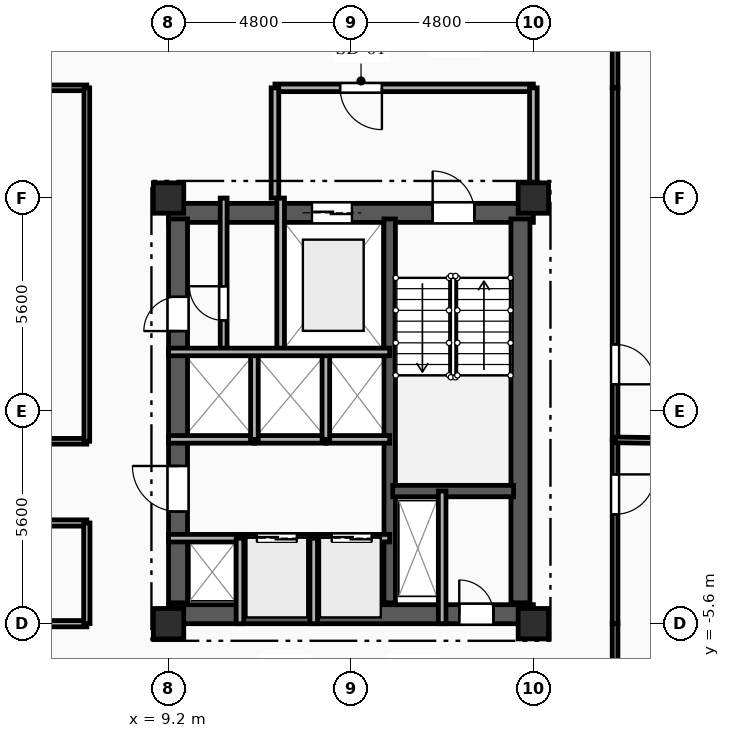
"""IFC4 building model, lengths in metres.
Left out: names, types, materials, properties, quantities, classifications, styles, units other than length and angle.
Written with IfcOpenShell. Run it as: python <this file> out.ifc"""

import sys

from ifc_helpers import new_model, si_unit, direction, frame, frame_2d, origin, origin_2d, place, context, subcontext, project, spatial, rectangle, extrude, element, fill, save


model = new_model("IFC4")
c1 = context("Model", 3, precision=1e-05, world=origin(), true_north=direction((0.0, 1.0)))
c2 = subcontext(c1, "Body", "Model", "MODEL_VIEW")
j1 = project(units=[si_unit("LENGTHUNIT", "METRE"), si_unit("PLANEANGLEUNIT", "RADIAN")], contexts=[c1])
p1 = place(None, origin())
s1 = spatial("IfcSite", under=j1, at=p1, CompositionType="ELEMENT")
p2 = place(p1, origin())
s2 = spatial("IfcBuilding", under=s1, at=p2, CompositionType="ELEMENT")
p3 = place(p2, frame((0.0, 0.0, 199.75)))
s3 = spatial("IfcBuildingStorey", under=s2, at=p3, CompositionType="ELEMENT", Elevation=199.75)
for number, where, z_axis, x_axis in (
    (1, (9.2, -5.6, 0.0), (0.0, 0.0, 1.0), (1.0, 0.0, 0.0)),
    (2, (9.2, 5.6, 0.0), (0.0, 0.0, 1.0), (1.0, 0.0, 0.0)),
    (3, (18.8, -5.6, 0.0), (0.0, 0.0, 1.0), (1.0, 0.0, 0.0)),
    (4, (18.8, 5.6, 0.0), (0.0, 0.0, 1.0), (1.0, 0.0, 0.0)),
):
    element("IfcColumn", number, at=place(p3, frame(where, z_axis=z_axis, x_axis=x_axis)), inside=s3, PredefinedType="COLUMN", context=c2, shape_type="SweptSolid", body=[
        extrude(rectangle(XDim=0.8, YDim=0.8, at=origin_2d()), origin(), (0.0, 0.0, 1.0), 3.35),
    ])
p4 = place(p3, frame((9.2, 5.21, 0.0), z_axis=(0.0, 0.0, 1.0), x_axis=(1.0, 0.0, 0.0)))
e5 = element("IfcWall", 5, at=p4, inside=s3, PredefinedType="SHEAR", context=c2, shape_type="SweptSolid", body=[
    extrude(rectangle(XDim=9.6, YDim=0.5, at=frame_2d((4.8, 0.0))), origin(), (0.0, 0.0, 1.0), 3.04),
])
p5 = place(p4, frame((6.95, 0.0, 0.0)))
e6 = element("IfcOpeningElement", 6, at=p5, cuts=e5, PredefinedType="OPENING", context=c2, shape_type="SweptSolid", body=[
    extrude(rectangle(XDim=1.1, YDim=2.15, at=frame_2d((0.55, 1.075))), frame((0.0, 0.26, 0.0), z_axis=(0.0, -1.0, 0.0), x_axis=(1.0, 0.0, 0.0)), (0.0, 0.0, 1.0), 0.52),
])
p6 = place(p4, frame((3.775, 0.0, 0.0)))
e7 = element("IfcOpeningElement", 7, at=p6, cuts=e5, PredefinedType="OPENING", context=c2, shape_type="SweptSolid", body=[
    extrude(rectangle(XDim=1.05, YDim=2.1, at=frame_2d((0.525, 1.05))), frame((0.0, 0.26, 0.0), z_axis=(0.0, -1.0, 0.0), x_axis=(1.0, 0.0, 0.0)), (0.0, 0.0, 1.0), 0.52),
])
p7 = place(p3, frame((9.2, -5.35, 0.0), z_axis=(0.0, 0.0, 1.0), x_axis=(1.0, 0.0, 0.0)))
e8 = element("IfcWall", 8, at=p7, inside=s3, PredefinedType="SHEAR", context=c2, shape_type="SweptSolid", body=[
    extrude(rectangle(XDim=9.6, YDim=0.5, at=frame_2d((4.8, 0.0))), origin(), (0.0, 0.0, 1.0), 3.04),
])
p8 = place(p7, frame((7.65, 0.0, 0.0)))
e9 = element("IfcOpeningElement", 9, at=p8, cuts=e8, PredefinedType="OPENING", context=c2, shape_type="SweptSolid", body=[
    extrude(rectangle(XDim=0.9, YDim=2.1, at=frame_2d((0.45, 1.05))), frame((0.0, 0.26, 0.0), z_axis=(0.0, -1.0, 0.0), x_axis=(1.0, 0.0, 0.0)), (0.0, 0.0, 1.0), 0.52),
])
p9 = place(p3, frame((9.45, -5.05, 0.0), z_axis=(0.0, 0.0, 1.0), x_axis=(0.0, 1.0, 0.0)))
e10 = element("IfcWall", 10, at=p9, inside=s3, PredefinedType="SHEAR", context=c2, shape_type="SweptSolid", body=[
    extrude(rectangle(XDim=10.1, YDim=0.5, at=frame_2d((5.05, 0.0))), origin(), (0.0, 0.0, 1.0), 3.04),
])
p10 = place(p9, frame((7.15, 0.0, 0.0)))
e11 = element("IfcOpeningElement", 11, at=p10, cuts=e10, PredefinedType="OPENING", context=c2, shape_type="SweptSolid", body=[
    extrude(rectangle(XDim=0.9, YDim=2.1, at=frame_2d((0.45, 1.05))), frame((0.0, 0.26, 0.0), z_axis=(0.0, -1.0, 0.0), x_axis=(1.0, 0.0, 0.0)), (0.0, 0.0, 1.0), 0.52),
])
p11 = place(p9, frame((2.4, 0.0, 0.0)))
e12 = element("IfcOpeningElement", 12, at=p11, cuts=e10, PredefinedType="OPENING", context=c2, shape_type="SweptSolid", body=[
    extrude(rectangle(XDim=1.2, YDim=2.15, at=frame_2d((0.6, 1.075))), frame((0.0, 0.26, 0.0), z_axis=(0.0, -1.0, 0.0), x_axis=(1.0, 0.0, 0.0)), (0.0, 0.0, 1.0), 0.52),
])
p12 = place(p3, frame((18.46, -5.05, 0.0), z_axis=(0.0, 0.0, 1.0), x_axis=(0.0, 1.0, 0.0)))
e13 = element("IfcWall", 13, at=p12, inside=s3, PredefinedType="SHEAR", context=c2, shape_type="SweptSolid", body=[
    extrude(rectangle(XDim=10.1, YDim=0.5, at=frame_2d((5.05, 0.0))), origin(), (0.0, 0.0, 1.0), 3.04),
])
p13 = place(p3, frame((15.02, -5.05, 0.0), z_axis=(0.0, 0.0, 1.0), x_axis=(0.0, 1.0, 0.0)))
e14 = element("IfcWall", 14, at=p13, inside=s3, PredefinedType="SHEAR", context=c2, shape_type="SweptSolid", body=[
    extrude(rectangle(XDim=10.1, YDim=0.3, at=frame_2d((5.05, 0.0))), origin(), (0.0, 0.0, 1.0), 3.04),
])
p14 = place(p3, frame((15.1, -2.11, 0.0), z_axis=(0.0, 0.0, 1.0), x_axis=(1.0, 0.0, 0.0)))
e15 = element("IfcWall", 15, at=p14, inside=s3, PredefinedType="SHEAR", context=c2, shape_type="SweptSolid", body=[
    extrude(rectangle(XDim=3.18, YDim=0.3, at=frame_2d((1.59, 0.0))), origin(), (0.0, 0.0, 1.0), 3.04),
])
p15 = place(p3, frame((16.4, -2.11, 0.0), z_axis=(0.0, 0.0, 1.0), x_axis=(0.0, -1.0, 0.0)))
e16 = element("IfcWall", 16, at=p15, inside=s3, PredefinedType="PARTITIONING", context=c2, shape_type="SweptSolid", body=[
    extrude(rectangle(XDim=3.49, YDim=0.2, at=frame_2d((1.745, 0.0))), origin(), (0.0, 0.0, 1.0), 3.04),
])
p16 = place(p3, frame((12.15, 5.6, 0.0), z_axis=(0.0, 0.0, 1.0), x_axis=(0.0, -1.0, 0.0)))
e17 = element("IfcWall", 17, at=p16, inside=s3, PredefinedType="PARTITIONING", context=c2, shape_type="SweptSolid", body=[
    extrude(rectangle(XDim=4.05, YDim=0.2, at=frame_2d((2.025, 0.0))), origin(), (0.0, 0.0, 1.0), 3.04),
])
p17 = place(p3, frame((18.8, 8.5, 0.0), z_axis=(0.0, 0.0, 1.0), x_axis=(-1.0, 0.0, 0.0)))
e18 = element("IfcWall", 18, at=p17, inside=s3, PredefinedType="PARTITIONING", context=c2, shape_type="SweptSolid", body=[
    extrude(rectangle(XDim=6.8, YDim=0.2, at=frame_2d((3.4, 0.0))), origin(), (0.0, 0.0, 1.0), 3.04),
])
p18 = place(p17, frame((3.985, 0.0, 0.0)))
e19 = element("IfcOpeningElement", 19, at=p18, cuts=e18, PredefinedType="OPENING", context=c2, shape_type="SweptSolid", body=[
    extrude(rectangle(XDim=1.1, YDim=2.15, at=frame_2d((0.55, 1.075))), frame((0.0, 0.11, 0.0), z_axis=(0.0, -1.0, 0.0), x_axis=(1.0, 0.0, 0.0)), (0.0, 0.0, 1.0), 0.22),
])
p19 = place(p3, frame((18.8, 5.6, 0.0), z_axis=(0.0, 0.0, 1.0), x_axis=(0.0, 1.0, 0.0)))
e20 = element("IfcWall", 20, at=p19, inside=s3, PredefinedType="PARTITIONING", context=c2, shape_type="SweptSolid", body=[
    extrude(rectangle(XDim=2.9, YDim=0.2, at=frame_2d((1.45, 0.0))), origin(), (0.0, 0.0, 1.0), 2.665),
])
p20 = place(p3, frame((12.0, 8.5, 0.0), z_axis=(0.0, 0.0, 1.0), x_axis=(0.0, -1.0, 0.0)))
e21 = element("IfcWall", 21, at=p20, inside=s3, PredefinedType="PARTITIONING", context=c2, shape_type="SweptSolid", body=[
    extrude(rectangle(XDim=2.9, YDim=0.2, at=frame_2d((1.45, 0.0))), origin(), (0.0, 0.0, 1.0), 3.04),
])
p21 = place(p3, frame((10.65, 1.55, 0.0), z_axis=(0.0, 0.0, 1.0), x_axis=(0.0, 1.0, 0.0)))
e22 = element("IfcWall", 22, at=p21, inside=s3, PredefinedType="PARTITIONING", context=c2, shape_type="SweptSolid", body=[
    extrude(rectangle(XDim=4.05, YDim=0.18, at=frame_2d((2.025, 0.0))), origin(), (0.0, 0.0, 1.0), 3.04),
])
p22 = place(p21, frame((0.829, 0.0, 0.0)))
e23 = element("IfcOpeningElement", 23, at=p22, cuts=e22, PredefinedType="OPENING", context=c2, shape_type="SweptSolid", body=[
    extrude(rectangle(XDim=0.9, YDim=2.1, at=frame_2d((0.45, 1.05))), frame((0.0, 0.1, 0.0), z_axis=(0.0, -1.0, 0.0), x_axis=(1.0, 0.0, 0.0)), (0.0, 0.0, 1.0), 0.2),
])
p23 = place(p3, frame((9.2, -3.35, 0.0), z_axis=(0.0, 0.0, 1.0), x_axis=(1.0, 0.0, 0.0)))
e24 = element("IfcWall", 24, at=p23, inside=s3, PredefinedType="PARTITIONING", context=c2, shape_type="SweptSolid", body=[
    extrude(rectangle(XDim=1.88, YDim=0.2, at=frame_2d((0.94, 0.0))), origin(), (0.0, 0.0, 1.0), 2.755),
])
p24 = place(p3, frame((11.08, -3.35, 0.0), z_axis=(0.0, 0.0, 1.0), x_axis=(1.0, 0.0, 0.0)))
e25 = element("IfcWall", 25, at=p24, inside=s3, PredefinedType="PARTITIONING", context=c2, shape_type="SweptSolid", body=[
    extrude(rectangle(XDim=1.94, YDim=0.2, at=frame_2d((0.97, 0.0))), origin(), (0.0, 0.0, 1.0), 3.04),
])
p25 = place(p24, frame((0.445, 0.0, 0.0)))
e26 = element("IfcOpeningElement", 26, at=p25, cuts=e25, PredefinedType="OPENING", context=c2, shape_type="SweptSolid", body=[
    extrude(rectangle(XDim=1.05, YDim=2.1, at=frame_2d((0.525, 1.05))), frame((0.0, 0.11, 0.0), z_axis=(0.0, -1.0, 0.0), x_axis=(1.0, 0.0, 0.0)), (0.0, 0.0, 1.0), 0.22),
])
p26 = place(p3, frame((13.02, -3.35, 0.0), z_axis=(0.0, 0.0, 1.0), x_axis=(1.0, 0.0, 0.0)))
e27 = element("IfcWall", 27, at=p26, inside=s3, PredefinedType="PARTITIONING", context=c2, shape_type="SweptSolid", body=[
    extrude(rectangle(XDim=2.0, YDim=0.2, at=frame_2d((1.0, 0.0))), origin(), (0.0, 0.0, 1.0), 3.04),
])
p27 = place(p26, frame((0.475, 0.0, 0.0)))
e28 = element("IfcOpeningElement", 28, at=p27, cuts=e27, PredefinedType="OPENING", context=c2, shape_type="SweptSolid", body=[
    extrude(rectangle(XDim=1.05, YDim=2.1, at=frame_2d((0.525, 1.05))), frame((0.0, 0.11, 0.0), z_axis=(0.0, -1.0, 0.0), x_axis=(1.0, 0.0, 0.0)), (0.0, 0.0, 1.0), 0.22),
])
p28 = place(p3, frame((11.46, -0.75, 0.0), z_axis=(0.0, 0.0, 1.0), x_axis=(-1.0, 0.0, 0.0)))
e29 = element("IfcWall", 29, at=p28, inside=s3, PredefinedType="PARTITIONING", context=c2, shape_type="SweptSolid", body=[
    extrude(rectangle(XDim=2.26, YDim=0.2, at=frame_2d((1.13, 0.0))), origin(), (0.0, 0.0, 1.0), 3.04),
])
p29 = place(p3, frame((13.34, -0.75, 0.0), z_axis=(0.0, 0.0, 1.0), x_axis=(-1.0, 0.0, 0.0)))
e30 = element("IfcWall", 30, at=p29, inside=s3, PredefinedType="PARTITIONING", context=c2, shape_type="SweptSolid", body=[
    extrude(rectangle(XDim=1.88, YDim=0.2, at=frame_2d((0.94, 0.0))), origin(), (0.0, 0.0, 1.0), 3.04),
])
p30 = place(p3, frame((15.02, -0.75, 0.0), z_axis=(0.0, 0.0, 1.0), x_axis=(-1.0, 0.0, 0.0)))
e31 = element("IfcWall", 31, at=p30, inside=s3, PredefinedType="PARTITIONING", context=c2, shape_type="SweptSolid", body=[
    extrude(rectangle(XDim=1.68, YDim=0.2, at=frame_2d((0.84, 0.0))), origin(), (0.0, 0.0, 1.0), 3.04),
])
for number, where, z_axis, x_axis in (
    (32, (11.08, -5.6, 0.0), (0.0, 0.0, 1.0), (0.0, 1.0, 0.0)),
    (33, (13.02, -5.6, 0.0), (0.0, 0.0, 1.0), (0.0, 1.0, 0.0)),
):
    element("IfcWall", number, at=place(p3, frame(where, z_axis=z_axis, x_axis=x_axis)), inside=s3, PredefinedType="PARTITIONING", context=c2, shape_type="SweptSolid", body=[
        extrude(rectangle(XDim=2.25, YDim=0.2, at=frame_2d((1.125, 0.0))), origin(), (0.0, 0.0, 1.0), 3.04),
    ])
for number, where, z_axis, x_axis in (
    (34, (11.46, -0.75, 0.0), (0.0, 0.0, 1.0), (0.0, 1.0, 0.0)),
    (35, (13.34, -0.75, 0.0), (0.0, 0.0, 1.0), (0.0, 1.0, 0.0)),
):
    element("IfcWall", number, at=place(p3, frame(where, z_axis=z_axis, x_axis=x_axis)), inside=s3, PredefinedType="PARTITIONING", context=c2, shape_type="SweptSolid", body=[
        extrude(rectangle(XDim=2.3, YDim=0.2, at=frame_2d((1.15, 0.0))), origin(), (0.0, 0.0, 1.0), 3.04),
    ])
p31 = place(p3, frame((20.95, 10.65, 0.0), z_axis=(0.0, 0.0, 1.0), x_axis=(0.0, -1.0, 0.0)))
e36 = element("IfcWall", 36, at=p31, inside=s3, PredefinedType="PARTITIONING", context=c2, shape_type="SweptSolid", body=[
    extrude(rectangle(XDim=2.15, YDim=0.15, at=frame_2d((1.075, 0.0))), origin(), (0.0, 0.0, 1.0), 3.04),
])
p32 = place(p3, frame((7.05, 8.5, 0.0), z_axis=(0.0, 0.0, 1.0), x_axis=(-1.0, 0.0, 0.0)))
e37 = element("IfcWall", 37, at=p32, inside=s3, PredefinedType="PARTITIONING", context=c2, shape_type="SweptSolid", body=[
    extrude(rectangle(XDim=7.05, YDim=0.15, at=frame_2d((3.525, 0.0))), origin(), (0.0, 0.0, 1.0), 3.04),
])
p33 = place(p3, frame((20.95, -5.6, 0.0), z_axis=(0.0, 0.0, 1.0), x_axis=(0.0, -1.0, 0.0)))
e38 = element("IfcWall", 38, at=p33, inside=s3, PredefinedType="PARTITIONING", context=c2, shape_type="SweptSolid", body=[
    extrude(rectangle(XDim=2.15, YDim=0.15, at=frame_2d((1.075, 0.0))), origin(), (0.0, 0.0, 1.0), 3.04),
])
p34 = place(p3, frame((0.0, -5.6, 0.0), z_axis=(0.0, 0.0, 1.0), x_axis=(1.0, 0.0, 0.0)))
e39 = element("IfcWall", 39, at=p34, inside=s3, PredefinedType="PARTITIONING", context=c2, shape_type="SweptSolid", body=[
    extrude(rectangle(XDim=7.05, YDim=0.165, at=frame_2d((3.525, 0.0))), origin(), (0.0, 0.0, 1.0), 2.525),
])
p35 = place(p3, frame((20.95, -0.763, 0.0), z_axis=(0.0, 0.0, 1.0), x_axis=(0.0, -1.0, 0.0)))
e40 = element("IfcWall", 40, at=p35, inside=s3, PredefinedType="PARTITIONING", context=c2, shape_type="SweptSolid", body=[
    extrude(rectangle(XDim=4.837, YDim=0.15, at=frame_2d((2.418, 0.0))), origin(), (0.0, 0.0, 1.0), 2.695),
])
p36 = place(p35, frame((0.908, 0.0, 0.0)))
e41 = element("IfcOpeningElement", 41, at=p36, cuts=e40, PredefinedType="OPENING", context=c2, shape_type="SweptSolid", body=[
    extrude(rectangle(XDim=1.05, YDim=2.15, at=frame_2d((0.525, 1.075))), frame((0.0, 0.085, 0.0), z_axis=(0.0, -1.0, 0.0), x_axis=(1.0, 0.0, 0.0)), (0.0, 0.0, 1.0), 0.17),
])
p37 = place(p3, frame((20.95, 8.5, 0.0), z_axis=(0.0, 0.0, 1.0), x_axis=(0.0, -1.0, 0.0)))
e42 = element("IfcWall", 42, at=p37, inside=s3, PredefinedType="PARTITIONING", context=c2, shape_type="SweptSolid", body=[
    extrude(rectangle(XDim=9.263, YDim=0.15, at=frame_2d((4.632, 0.0))), origin(), (0.0, 0.0, 1.0), 2.695),
])
p38 = place(p37, frame((6.751, 0.0, 0.0)))
e43 = element("IfcOpeningElement", 43, at=p38, cuts=e42, PredefinedType="OPENING", context=c2, shape_type="SweptSolid", body=[
    extrude(rectangle(XDim=1.05, YDim=2.15, at=frame_2d((0.525, 1.075))), frame((0.0, 0.085, 0.0), z_axis=(0.0, -1.0, 0.0), x_axis=(1.0, 0.0, 0.0)), (0.0, 0.0, 1.0), 0.17),
])
p39 = place(p3, frame((-7.05, -0.8, 0.0), z_axis=(0.0, 0.0, 1.0), x_axis=(1.0, 0.0, 0.0)))
e44 = element("IfcWall", 44, at=p39, inside=s3, PredefinedType="PARTITIONING", context=c2, shape_type="SweptSolid", body=[
    extrude(rectangle(XDim=14.1, YDim=0.15, at=frame_2d((7.05, 0.0))), origin(), (0.0, 0.0, 1.0), 3.04),
])
p40 = place(p39, frame((6.525, 0.0, 0.0)))
e45 = element("IfcOpeningElement", 45, at=p40, cuts=e44, PredefinedType="OPENING", context=c2, shape_type="SweptSolid", body=[
    extrude(rectangle(XDim=1.05, YDim=2.15, at=frame_2d((0.525, 1.075))), frame((0.0, 0.085, 0.0), z_axis=(0.0, -1.0, 0.0), x_axis=(1.0, 0.0, 0.0)), (0.0, 0.0, 1.0), 0.17),
])
p41 = place(p3, frame((7.05, -2.95, 0.0), z_axis=(0.0, 0.0, 1.0), x_axis=(-1.0, 0.0, 0.0)))
e46 = element("IfcWall", 46, at=p41, inside=s3, PredefinedType="PARTITIONING", context=c2, shape_type="SweptSolid", body=[
    extrude(rectangle(XDim=14.1, YDim=0.165, at=frame_2d((7.05, 0.0))), origin(), (0.0, 0.0, 1.0), 3.04),
])
p42 = place(p41, frame((6.475, 0.0, 0.0)))
e47 = element("IfcOpeningElement", 47, at=p42, cuts=e46, PredefinedType="OPENING", context=c2, shape_type="SweptSolid", body=[
    extrude(rectangle(XDim=1.15, YDim=2.15, at=frame_2d((0.575, 1.075))), frame((0.0, 0.093, 0.0), z_axis=(0.0, -1.0, 0.0), x_axis=(1.0, 0.0, 0.0)), (0.0, 0.0, 1.0), 0.185),
])
p43 = place(p3, frame((7.05, -0.8, 0.0), z_axis=(0.0, 0.0, 1.0), x_axis=(0.0, 1.0, 0.0)))
e48 = element("IfcWall", 48, at=p43, inside=s3, PredefinedType="PARTITIONING", context=c2, shape_type="SweptSolid", body=[
    extrude(rectangle(XDim=9.3, YDim=0.15, at=frame_2d((4.65, 0.0))), origin(), (0.0, 0.0, 1.0), 3.04),
])
p44 = place(p3, frame((7.05, -5.6, 0.0), z_axis=(0.0, 0.0, 1.0), x_axis=(0.0, 1.0, 0.0)))
e49 = element("IfcWall", 49, at=p44, inside=s3, PredefinedType="PARTITIONING", context=c2, shape_type="SweptSolid", body=[
    extrude(rectangle(XDim=2.65, YDim=0.165, at=frame_2d((1.325, 0.0))), origin(), (0.0, 0.0, 1.0), 3.04),
])
p45 = place(p3, frame((20.95, -0.763, 0.0), z_axis=(0.0, 0.0, 1.0), x_axis=(0.999875696831, -0.015766765259, 0.0)))
e50 = element("IfcWall", 50, at=p45, inside=s3, PredefinedType="PARTITIONING", context=c2, shape_type="SweptSolid", body=[
    extrude(rectangle(XDim=2.787, YDim=0.15, at=frame_2d((1.394, 0.0))), origin(), (0.0, 0.0, 1.0), 3.04),
])
p46 = place(p3, frame((9.2, 1.55, 0.0), z_axis=(0.0, 0.0, 1.0), x_axis=(1.0, 0.0, 0.0)))
e51 = element("IfcWall", 51, at=p46, inside=s3, PredefinedType="PARTITIONING", context=c2, shape_type="SweptSolid", body=[
    extrude(rectangle(XDim=5.82, YDim=0.2, at=frame_2d((2.91, 0.0))), origin(), (0.0, 0.0, 1.0), 3.04),
])
p47 = place(p5, origin())
e52 = element("IfcDoor", 52, at=p47, inside=s3, OperationType="SINGLE_SWING_LEFT", PredefinedType="DOOR", context=c2, shape_type="SweptSolid", body=[
    extrude(rectangle(XDim=1.1, YDim=2.15, at=frame_2d((0.55, 1.075))), frame((0.0, 0.025, 0.0), z_axis=(0.0, -1.0, 0.0), x_axis=(1.0, 0.0, 0.0)), (0.0, 0.0, 1.0), 0.05),
])
fill(e6, e52)
p48 = place(p6, origin())
e53 = element("IfcDoor", 53, at=p48, inside=s3, OperationType="DOUBLE_DOOR_SLIDING", PredefinedType="DOOR", context=c2, shape_type="SweptSolid", body=[
    extrude(rectangle(XDim=1.05, YDim=2.1, at=frame_2d((0.525, 1.05))), frame((0.0, 0.025, 0.0), z_axis=(0.0, -1.0, 0.0), x_axis=(1.0, 0.0, 0.0)), (0.0, 0.0, 1.0), 0.05),
])
fill(e7, e53)
p49 = place(p8, origin())
e54 = element("IfcDoor", 54, at=p49, inside=s3, OperationType="SINGLE_SWING_LEFT", PredefinedType="DOOR", context=c2, shape_type="SweptSolid", body=[
    extrude(rectangle(XDim=0.9, YDim=2.1, at=frame_2d((0.45, 1.05))), frame((0.0, 0.025, 0.0), z_axis=(0.0, -1.0, 0.0), x_axis=(1.0, 0.0, 0.0)), (0.0, 0.0, 1.0), 0.05),
])
fill(e9, e54)
p50 = place(p18, origin())
e55 = element("IfcDoor", 55, at=p50, inside=s3, OperationType="SINGLE_SWING_LEFT", PredefinedType="DOOR", context=c2, shape_type="SweptSolid", body=[
    extrude(rectangle(XDim=1.1, YDim=2.15, at=frame_2d((0.55, 1.075))), frame((0.0, 0.025, 0.0), z_axis=(0.0, -1.0, 0.0), x_axis=(1.0, 0.0, 0.0)), (0.0, 0.0, 1.0), 0.05),
])
fill(e19, e55)
p51 = place(p22, origin())
e56 = element("IfcDoor", 56, at=p51, inside=s3, OperationType="SINGLE_SWING_RIGHT", PredefinedType="DOOR", context=c2, shape_type="SweptSolid", body=[
    extrude(rectangle(XDim=0.9, YDim=2.1, at=frame_2d((0.45, 1.05))), frame((0.0, 0.025, 0.0), z_axis=(0.0, -1.0, 0.0), x_axis=(1.0, 0.0, 0.0)), (0.0, 0.0, 1.0), 0.05),
])
fill(e23, e56)
p52 = place(p10, origin())
e57 = element("IfcDoor", 57, at=p52, inside=s3, OperationType="SINGLE_SWING_LEFT", PredefinedType="DOOR", context=c2, shape_type="SweptSolid", body=[
    extrude(rectangle(XDim=0.9, YDim=2.1, at=frame_2d((0.45, 1.05))), frame((0.0, 0.025, 0.0), z_axis=(0.0, -1.0, 0.0), x_axis=(1.0, 0.0, 0.0)), (0.0, 0.0, 1.0), 0.05),
])
fill(e11, e57)
p53 = place(p25, origin())
e58 = element("IfcDoor", 58, at=p53, inside=s3, OperationType="DOUBLE_DOOR_SLIDING", PredefinedType="DOOR", context=c2, shape_type="SweptSolid", body=[
    extrude(rectangle(XDim=1.05, YDim=2.1, at=frame_2d((0.525, 1.05))), frame((0.0, 0.025, 0.0), z_axis=(0.0, -1.0, 0.0), x_axis=(1.0, 0.0, 0.0)), (0.0, 0.0, 1.0), 0.05),
])
fill(e26, e58)
p54 = place(p27, origin())
e59 = element("IfcDoor", 59, at=p54, inside=s3, OperationType="DOUBLE_DOOR_SLIDING", PredefinedType="DOOR", context=c2, shape_type="SweptSolid", body=[
    extrude(rectangle(XDim=1.05, YDim=2.1, at=frame_2d((0.525, 1.05))), frame((0.0, 0.025, 0.0), z_axis=(0.0, -1.0, 0.0), x_axis=(1.0, 0.0, 0.0)), (0.0, 0.0, 1.0), 0.05),
])
fill(e28, e59)
p55 = place(p11, origin())
e60 = element("IfcDoor", 60, at=p55, inside=s3, OperationType="SINGLE_SWING_RIGHT", PredefinedType="DOOR", context=c2, shape_type="SweptSolid", body=[
    extrude(rectangle(XDim=1.2, YDim=2.15, at=frame_2d((0.6, 1.075))), frame((0.0, 0.025, 0.0), z_axis=(0.0, -1.0, 0.0), x_axis=(1.0, 0.0, 0.0)), (0.0, 0.0, 1.0), 0.05),
])
fill(e12, e60)
p56 = place(p36, origin())
e61 = element("IfcDoor", 61, at=p56, inside=s3, OperationType="SINGLE_SWING_LEFT", PredefinedType="DOOR", context=c2, shape_type="SweptSolid", body=[
    extrude(rectangle(XDim=1.05, YDim=2.15, at=frame_2d((0.525, 1.075))), frame((0.0, 0.025, 0.0), z_axis=(0.0, -1.0, 0.0), x_axis=(1.0, 0.0, 0.0)), (0.0, 0.0, 1.0), 0.05),
])
fill(e41, e61)
p57 = place(p38, origin())
e62 = element("IfcDoor", 62, at=p57, inside=s3, OperationType="SINGLE_SWING_RIGHT", PredefinedType="DOOR", context=c2, shape_type="SweptSolid", body=[
    extrude(rectangle(XDim=1.05, YDim=2.15, at=frame_2d((0.525, 1.075))), frame((0.0, 0.025, 0.0), z_axis=(0.0, -1.0, 0.0), x_axis=(1.0, 0.0, 0.0)), (0.0, 0.0, 1.0), 0.05),
])
fill(e43, e62)
save(model, sys.argv[1])
